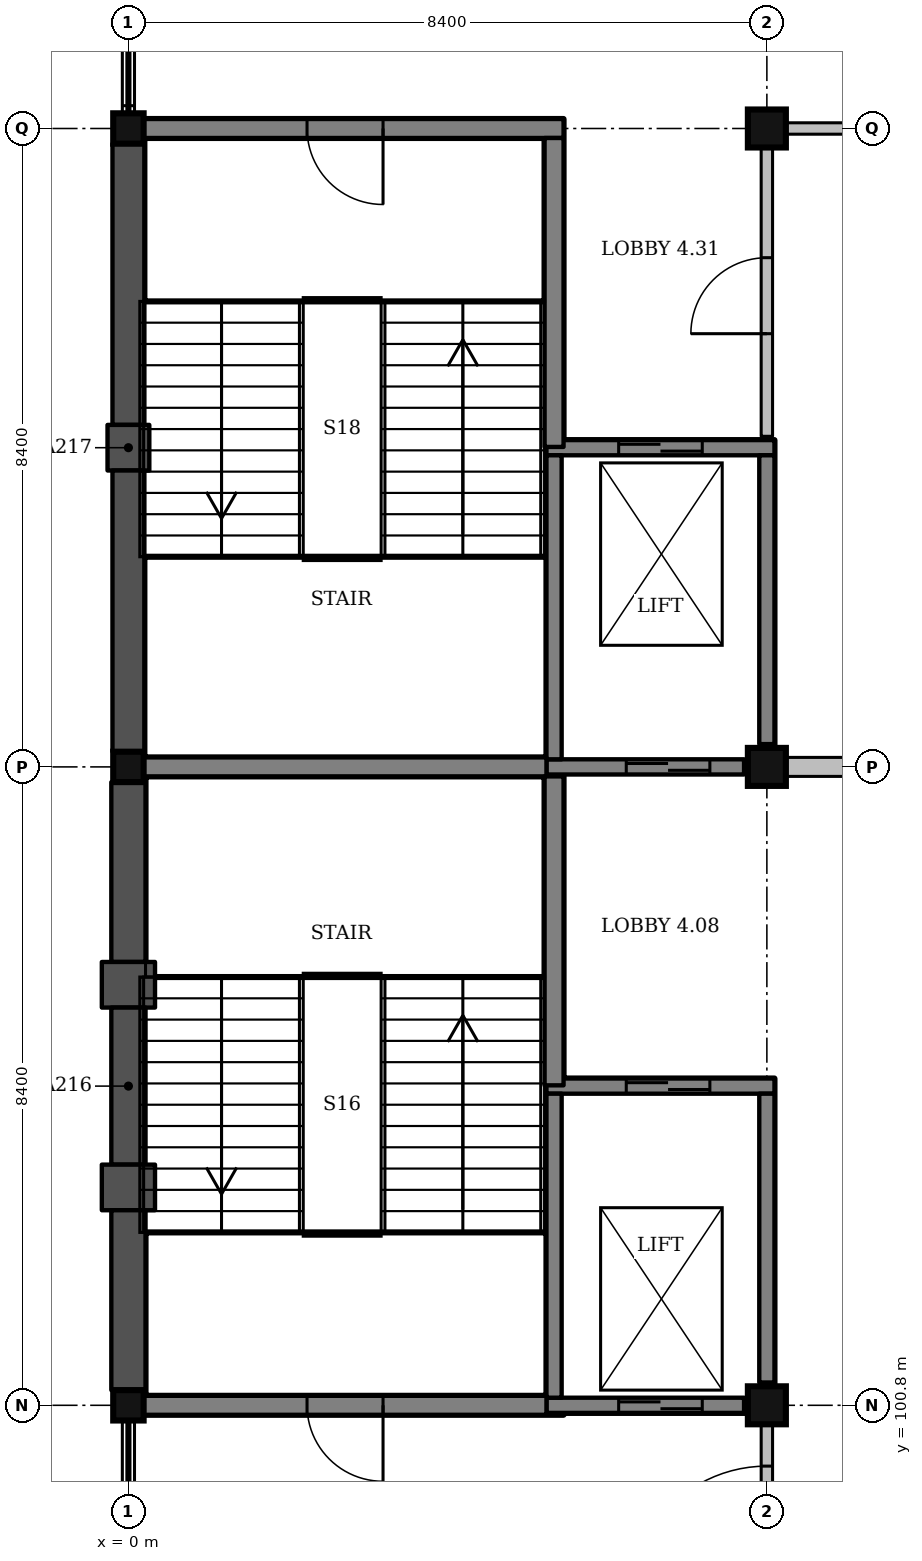
"""IFC4 building model, lengths in metres.
Left out: names, types, materials, properties, quantities, classifications, styles, units other than length and angle.
Written with IfcOpenShell. Run it as: python <this file> out.ifc"""

import sys

from ifc_helpers import new_model, si_unit, direction, frame, frame_2d, origin, origin_2d, place, context, subcontext, project, spatial, rectangle, extrude, element, fill, save


model = new_model("IFC4")
c1 = context("Model", 3, precision=1e-05, world=origin(), true_north=direction((0.0, 1.0)))
c2 = subcontext(c1, "Body", "Model", "MODEL_VIEW")
j1 = project(units=[si_unit("LENGTHUNIT", "METRE"), si_unit("PLANEANGLEUNIT", "RADIAN")], contexts=[c1])
p1 = place(None, origin())
s1 = spatial("IfcSite", under=j1, at=p1, CompositionType="ELEMENT")
p2 = place(p1, origin())
s2 = spatial("IfcBuilding", under=s1, at=p2, CompositionType="ELEMENT")
p3 = place(p2, frame((0.0, 0.0, 18.0)))
s3 = spatial("IfcBuildingStorey", under=s2, at=p3, CompositionType="ELEMENT", Elevation=18.0)
for number, where, z_axis, x_axis in (
    (1, (0.0, 100.8, 0.0), (0.0, 0.0, 1.0), (1.0, 0.0, 0.0)),
    (2, (0.0, 109.2, 0.0), (0.0, 0.0, 1.0), (1.0, 0.0, 0.0)),
):
    element("IfcColumn", number, at=place(p3, frame(where, z_axis=z_axis, x_axis=x_axis)), inside=s3, PredefinedType="COLUMN", context=c2, shape_type="SweptSolid", body=[
        extrude(rectangle(XDim=0.4, YDim=0.4, at=origin_2d()), origin(), (0.0, 0.0, 1.0), 4.5),
    ])
for number, where, z_axis, x_axis in (
    (3, (8.4, 100.8, 0.0), (0.0, 0.0, 1.0), (1.0, 0.0, 0.0)),
    (4, (8.4, 109.2, 0.0), (0.0, 0.0, 1.0), (1.0, 0.0, 0.0)),
):
    element("IfcColumn", number, at=place(p3, frame(where, z_axis=z_axis, x_axis=x_axis)), inside=s3, PredefinedType="COLUMN", context=c2, shape_type="SweptSolid", body=[
        extrude(rectangle(XDim=0.5, YDim=0.5, at=origin_2d()), origin(), (0.0, 0.0, 1.0), 4.5),
    ])
p4 = place(p3, frame((0.0, 117.6, 0.0), z_axis=(0.0, 0.0, 1.0), x_axis=(1.0, 0.0, 0.0)))
e5 = element("IfcColumn", 5, at=p4, inside=s3, PredefinedType="COLUMN", context=c2, shape_type="SweptSolid", body=[
    extrude(rectangle(XDim=0.4, YDim=0.4, at=origin_2d()), origin(), (0.0, 0.0, 1.0), 4.5),
])
p5 = place(p3, frame((8.4, 117.6, 0.0), z_axis=(0.0, 0.0, 1.0), x_axis=(1.0, 0.0, 0.0)))
e6 = element("IfcColumn", 6, at=p5, inside=s3, PredefinedType="COLUMN", context=c2, shape_type="SweptSolid", body=[
    extrude(rectangle(XDim=0.5, YDim=0.5, at=origin_2d()), origin(), (0.0, 0.0, 1.0), 4.5),
])
p6 = place(p3, frame((5.5, 100.8, 0.0), z_axis=(0.0, 0.0, 1.0), x_axis=(1.0, 0.0, 0.0)))
e7 = element("IfcWall", 7, at=p6, inside=s3, PredefinedType="SHEAR", context=c2, shape_type="SweptSolid", body=[
    extrude(rectangle(XDim=2.6, YDim=0.2, at=frame_2d((1.3, 0.0))), origin(), (0.0, 0.0, 1.0), 4.5),
])
p7 = place(p6, frame((0.95, 0.0, 0.0)))
e8 = element("IfcOpeningElement", 8, at=p7, cuts=e7, PredefinedType="OPENING", context=c2, shape_type="SweptSolid", body=[
    extrude(rectangle(XDim=1.1, YDim=2.1, at=frame_2d((0.55, 1.05))), frame((0.0, 0.11, 0.0), z_axis=(0.0, -1.0, 0.0), x_axis=(1.0, 0.0, 0.0)), (0.0, 0.0, 1.0), 0.22),
])
p8 = place(p3, frame((5.5, 105.0, 0.0), z_axis=(0.0, 0.0, 1.0), x_axis=(1.0, 0.0, 0.0)))
e9 = element("IfcWall", 9, at=p8, inside=s3, PredefinedType="SHEAR", context=c2, shape_type="SweptSolid", body=[
    extrude(rectangle(XDim=3.0, YDim=0.2, at=frame_2d((1.5, 0.0))), origin(), (0.0, 0.0, 1.0), 4.5),
])
p9 = place(p8, frame((1.05, 0.0, 0.0)))
e10 = element("IfcOpeningElement", 10, at=p9, cuts=e9, PredefinedType="OPENING", context=c2, shape_type="SweptSolid", body=[
    extrude(rectangle(XDim=1.1, YDim=2.1, at=frame_2d((0.55, 1.05))), frame((0.0, 0.11, 0.0), z_axis=(0.0, -1.0, 0.0), x_axis=(1.0, 0.0, 0.0)), (0.0, 0.0, 1.0), 0.22),
])
p10 = place(p3, frame((5.6, 100.9, 0.0), z_axis=(0.0, 0.0, 1.0), x_axis=(0.0, 1.0, 0.0)))
e11 = element("IfcWall", 11, at=p10, inside=s3, PredefinedType="SHEAR", context=c2, shape_type="SweptSolid", body=[
    extrude(rectangle(XDim=4.0, YDim=0.2, at=frame_2d((2.0, 0.0))), origin(), (0.0, 0.0, 1.0), 4.5),
])
p11 = place(p3, frame((8.4, 101.1, 0.0), z_axis=(0.0, 0.0, 1.0), x_axis=(0.0, 1.0, 0.0)))
e12 = element("IfcWall", 12, at=p11, inside=s3, PredefinedType="SHEAR", context=c2, shape_type="SweptSolid", body=[
    extrude(rectangle(XDim=3.8, YDim=0.2, at=frame_2d((1.9, 0.0))), origin(), (0.0, 0.0, 1.0), 4.5),
])
p12 = place(p3, frame((5.5, 109.2, 0.0), z_axis=(0.0, 0.0, 1.0), x_axis=(1.0, 0.0, 0.0)))
e13 = element("IfcWall", 13, at=p12, inside=s3, PredefinedType="SHEAR", context=c2, shape_type="SweptSolid", body=[
    extrude(rectangle(XDim=2.6, YDim=0.2, at=frame_2d((1.3, 0.0))), origin(), (0.0, 0.0, 1.0), 4.5),
])
p13 = place(p12, frame((1.05, 0.0, 0.0)))
e14 = element("IfcOpeningElement", 14, at=p13, cuts=e13, PredefinedType="OPENING", context=c2, shape_type="SweptSolid", body=[
    extrude(rectangle(XDim=1.1, YDim=2.1, at=frame_2d((0.55, 1.05))), frame((0.0, 0.11, 0.0), z_axis=(0.0, -1.0, 0.0), x_axis=(1.0, 0.0, 0.0)), (0.0, 0.0, 1.0), 0.22),
])
p14 = place(p3, frame((5.5, 113.4, 0.0), z_axis=(0.0, 0.0, 1.0), x_axis=(1.0, 0.0, 0.0)))
e15 = element("IfcWall", 15, at=p14, inside=s3, PredefinedType="SHEAR", context=c2, shape_type="SweptSolid", body=[
    extrude(rectangle(XDim=3.0, YDim=0.2, at=frame_2d((1.5, 0.0))), origin(), (0.0, 0.0, 1.0), 4.5),
])
p15 = place(p14, frame((0.95, 0.0, 0.0)))
e16 = element("IfcOpeningElement", 16, at=p15, cuts=e15, PredefinedType="OPENING", context=c2, shape_type="SweptSolid", body=[
    extrude(rectangle(XDim=1.1, YDim=2.1, at=frame_2d((0.55, 1.05))), frame((0.0, 0.11, 0.0), z_axis=(0.0, -1.0, 0.0), x_axis=(1.0, 0.0, 0.0)), (0.0, 0.0, 1.0), 0.22),
])
p16 = place(p3, frame((5.6, 109.3, 0.0), z_axis=(0.0, 0.0, 1.0), x_axis=(0.0, 1.0, 0.0)))
e17 = element("IfcWall", 17, at=p16, inside=s3, PredefinedType="SHEAR", context=c2, shape_type="SweptSolid", body=[
    extrude(rectangle(XDim=4.0, YDim=0.2, at=frame_2d((2.0, 0.0))), origin(), (0.0, 0.0, 1.0), 4.5),
])
p17 = place(p3, frame((8.4, 109.5, 0.0), z_axis=(0.0, 0.0, 1.0), x_axis=(0.0, 1.0, 0.0)))
e18 = element("IfcWall", 18, at=p17, inside=s3, PredefinedType="SHEAR", context=c2, shape_type="SweptSolid", body=[
    extrude(rectangle(XDim=3.8, YDim=0.2, at=frame_2d((1.9, 0.0))), origin(), (0.0, 0.0, 1.0), 4.5),
])
p18 = place(p3, frame((0.2, 100.8, 0.0), z_axis=(0.0, 0.0, 1.0), x_axis=(1.0, 0.0, 0.0)))
e19 = element("IfcWall", 19, at=p18, inside=s3, PredefinedType="SHEAR", context=c2, shape_type="SweptSolid", body=[
    extrude(rectangle(XDim=5.3, YDim=0.25, at=frame_2d((2.65, 0.0))), origin(), (0.0, 0.0, 1.0), 4.5),
])
p19 = place(p18, frame((2.15, 0.0, 0.0)))
e20 = element("IfcOpeningElement", 20, at=p19, cuts=e19, PredefinedType="OPENING", context=c2, shape_type="SweptSolid", body=[
    extrude(rectangle(XDim=1.0, YDim=2.1, at=frame_2d((0.5, 1.05))), frame((0.0, 0.135, 0.0), z_axis=(0.0, -1.0, 0.0), x_axis=(1.0, 0.0, 0.0)), (0.0, 0.0, 1.0), 0.27),
])
p20 = place(p3, frame((0.2, 109.2, 0.0), z_axis=(0.0, 0.0, 1.0), x_axis=(1.0, 0.0, 0.0)))
e21 = element("IfcWall", 21, at=p20, inside=s3, PredefinedType="SHEAR", context=c2, shape_type="SweptSolid", body=[
    extrude(rectangle(XDim=5.3, YDim=0.25, at=frame_2d((2.65, 0.0))), origin(), (0.0, 0.0, 1.0), 4.5),
])
p21 = place(p3, frame((5.6, 105.01, 0.0), z_axis=(0.0, 0.0, 1.0), x_axis=(0.0, 1.0, 0.0)))
e22 = element("IfcWall", 22, at=p21, inside=s3, PredefinedType="SHEAR", context=c2, shape_type="SweptSolid", body=[
    extrude(rectangle(XDim=4.065, YDim=0.25, at=frame_2d((2.032, 0.0))), origin(), (0.0, 0.0, 1.0), 4.5),
])
p22 = place(p3, frame((0.2, 117.6, 0.0), z_axis=(0.0, 0.0, 1.0), x_axis=(1.0, 0.0, 0.0)))
e23 = element("IfcWall", 23, at=p22, inside=s3, PredefinedType="SHEAR", context=c2, shape_type="SweptSolid", body=[
    extrude(rectangle(XDim=5.525, YDim=0.25, at=frame_2d((2.763, 0.0))), origin(), (0.0, 0.0, 1.0), 4.5),
])
p23 = place(p22, frame((2.15, 0.0, 0.0)))
e24 = element("IfcOpeningElement", 24, at=p23, cuts=e23, PredefinedType="OPENING", context=c2, shape_type="SweptSolid", body=[
    extrude(rectangle(XDim=1.0, YDim=2.1, at=frame_2d((0.5, 1.05))), frame((0.0, 0.135, 0.0), z_axis=(0.0, -1.0, 0.0), x_axis=(1.0, 0.0, 0.0)), (0.0, 0.0, 1.0), 0.27),
])
p24 = place(p3, frame((5.6, 113.41, 0.0), z_axis=(0.0, 0.0, 1.0), x_axis=(0.0, 1.0, 0.0)))
e25 = element("IfcWall", 25, at=p24, inside=s3, PredefinedType="SHEAR", context=c2, shape_type="SweptSolid", body=[
    extrude(rectangle(XDim=4.065, YDim=0.25, at=frame_2d((2.033, 0.0))), origin(), (0.0, 0.0, 1.0), 4.5),
])
p25 = place(p3, frame((0.0, 109.0, 0.0), z_axis=(0.0, 0.0, 1.0), x_axis=(0.0, -1.0, 0.0)))
e26 = element("IfcWall", 26, at=p25, inside=s3, PredefinedType="SOLIDWALL", context=c2, shape_type="SweptSolid", body=[
    extrude(rectangle(XDim=2.367, YDim=0.45, at=frame_2d((1.183, 0.0))), origin(), (0.0, 0.0, 1.0), 3.65),
])
p26 = place(p3, frame((0.0, 106.633, 0.0), z_axis=(0.0, 0.0, 1.0), x_axis=(0.0, -1.0, 0.0)))
e27 = element("IfcWall", 27, at=p26, inside=s3, PredefinedType="SOLIDWALL", context=c2, shape_type="SweptSolid", body=[
    extrude(rectangle(XDim=0.6, YDim=0.7, at=frame_2d((0.3, 0.0))), origin(), (0.0, 0.0, 1.0), 3.65),
])
p27 = place(p3, frame((0.0, 106.033, 0.0), z_axis=(0.0, 0.0, 1.0), x_axis=(0.0, -1.0, 0.0)))
e28 = element("IfcWall", 28, at=p27, inside=s3, PredefinedType="SOLIDWALL", context=c2, shape_type="SweptSolid", body=[
    extrude(rectangle(XDim=2.066, YDim=0.45, at=frame_2d((1.033, 0.0))), origin(), (0.0, 0.0, 1.0), 3.65),
])
p28 = place(p3, frame((0.0, 103.967, 0.0), z_axis=(0.0, 0.0, 1.0), x_axis=(0.0, -1.0, 0.0)))
e29 = element("IfcWall", 29, at=p28, inside=s3, PredefinedType="SOLIDWALL", context=c2, shape_type="SweptSolid", body=[
    extrude(rectangle(XDim=0.6, YDim=0.7, at=frame_2d((0.3, 0.0))), origin(), (0.0, 0.0, 1.0), 3.65),
])
p29 = place(p3, frame((0.0, 103.367, 0.0), z_axis=(0.0, 0.0, 1.0), x_axis=(0.0, -1.0, 0.0)))
e30 = element("IfcWall", 30, at=p29, inside=s3, PredefinedType="SOLIDWALL", context=c2, shape_type="SweptSolid", body=[
    extrude(rectangle(XDim=2.367, YDim=0.45, at=frame_2d((1.183, 0.0))), origin(), (0.0, 0.0, 1.0), 3.65),
])
p30 = place(p3, frame((0.0, 117.4, 0.0), z_axis=(0.0, 0.0, 1.0), x_axis=(0.0, -1.0, 0.0)))
e31 = element("IfcWall", 31, at=p30, inside=s3, PredefinedType="SOLIDWALL", context=c2, shape_type="SweptSolid", body=[
    extrude(rectangle(XDim=3.7, YDim=0.42, at=frame_2d((1.85, 0.0))), origin(), (0.0, 0.0, 1.0), 4.5),
])
p31 = place(p3, frame((0.0, 113.7, 0.0), z_axis=(0.0, 0.0, 1.0), x_axis=(0.0, -1.0, 0.0)))
e32 = element("IfcWall", 32, at=p31, inside=s3, PredefinedType="SOLIDWALL", context=c2, shape_type="SweptSolid", body=[
    extrude(rectangle(XDim=0.6, YDim=0.55, at=frame_2d((0.3, 0.0))), origin(), (0.0, 0.0, 1.0), 4.5),
])
p32 = place(p3, frame((0.0, 113.1, 0.0), z_axis=(0.0, 0.0, 1.0), x_axis=(0.0, -1.0, 0.0)))
e33 = element("IfcWall", 33, at=p32, inside=s3, PredefinedType="SOLIDWALL", context=c2, shape_type="SweptSolid", body=[
    extrude(rectangle(XDim=3.7, YDim=0.42, at=frame_2d((1.85, 0.0))), origin(), (0.0, 0.0, 1.0), 4.5),
])
p33 = place(p3, frame((8.65, 109.2, 0.0), z_axis=(0.0, 0.0, 1.0), x_axis=(1.0, 0.0, 0.0)))
e34 = element("IfcWall", 34, at=p33, inside=s3, PredefinedType="SOLIDWALL", context=c2, shape_type="SweptSolid", body=[
    extrude(rectangle(XDim=7.9, YDim=0.25, at=frame_2d((3.95, 0.0))), origin(), (0.0, 0.0, 1.0), 4.15),
])
p34 = place(p3, frame((8.65, 117.6, 0.0), z_axis=(0.0, 0.0, 1.0), x_axis=(1.0, 0.0, 0.0)))
e35 = element("IfcWall", 35, at=p34, inside=s3, PredefinedType="PARTITIONING", context=c2, shape_type="SweptSolid", body=[
    extrude(rectangle(XDim=7.9, YDim=0.15, at=frame_2d((3.95, 0.0))), origin(), (0.0, 0.0, 1.0), 3.4),
])
p35 = place(p3, frame((8.4, 92.65, 0.0), z_axis=(0.0, 0.0, 1.0), x_axis=(0.0, 1.0, 0.0)))
e36 = element("IfcWall", 36, at=p35, inside=s3, PredefinedType="PARTITIONING", context=c2, shape_type="SweptSolid", body=[
    extrude(rectangle(XDim=7.9, YDim=0.15, at=frame_2d((3.95, 0.0))), origin(), (0.0, 0.0, 1.0), 3.4),
])
p36 = place(p35, frame((5.55, 0.0, 0.0)))
e37 = element("IfcOpeningElement", 37, at=p36, cuts=e36, PredefinedType="OPENING", context=c2, shape_type="SweptSolid", body=[
    extrude(rectangle(XDim=1.8, YDim=2.1, at=frame_2d((0.9, 1.05))), frame((0.0, 0.085, 0.0), z_axis=(0.0, -1.0, 0.0), x_axis=(1.0, 0.0, 0.0)), (0.0, 0.0, 1.0), 0.17),
])
p37 = place(p3, frame((8.4, 113.55, 0.0), z_axis=(0.0, 0.0, 1.0), x_axis=(0.0, 1.0, 0.0)))
e38 = element("IfcWall", 38, at=p37, inside=s3, PredefinedType="PARTITIONING", context=c2, shape_type="SweptSolid", body=[
    extrude(rectangle(XDim=3.8, YDim=0.15, at=frame_2d((1.9, 0.0))), origin(), (0.0, 0.0, 1.0), 3.4),
])
p38 = place(p37, frame((1.35, 0.0, 0.0)))
e39 = element("IfcOpeningElement", 39, at=p38, cuts=e38, PredefinedType="OPENING", context=c2, shape_type="SweptSolid", body=[
    extrude(rectangle(XDim=1.0, YDim=2.1, at=frame_2d((0.5, 1.05))), frame((0.0, 0.085, 0.0), z_axis=(0.0, -1.0, 0.0), x_axis=(1.0, 0.0, 0.0)), (0.0, 0.0, 1.0), 0.17),
])
p39 = place(p36, origin())
e40 = element("IfcDoor", 40, at=p39, inside=s3, OperationType="DOUBLE_DOOR_SINGLE_SWING", PredefinedType="DOOR", context=c2, shape_type="SweptSolid", body=[
    extrude(rectangle(XDim=1.8, YDim=2.1, at=frame_2d((0.9, 1.05))), frame((0.0, 0.025, 0.0), z_axis=(0.0, -1.0, 0.0), x_axis=(1.0, 0.0, 0.0)), (0.0, 0.0, 1.0), 0.05),
])
fill(e37, e40)
p40 = place(p38, origin())
e41 = element("IfcDoor", 41, at=p40, inside=s3, OperationType="SINGLE_SWING_LEFT", PredefinedType="DOOR", context=c2, shape_type="SweptSolid", body=[
    extrude(rectangle(XDim=1.0, YDim=2.1, at=frame_2d((0.5, 1.05))), frame((0.0, 0.025, 0.0), z_axis=(0.0, -1.0, 0.0), x_axis=(1.0, 0.0, 0.0)), (0.0, 0.0, 1.0), 0.05),
])
fill(e39, e41)
p41 = place(p19, origin())
e42 = element("IfcDoor", 42, at=p41, inside=s3, OperationType="SINGLE_SWING_RIGHT", PredefinedType="DOOR", context=c2, shape_type="SweptSolid", body=[
    extrude(rectangle(XDim=1.0, YDim=2.1, at=frame_2d((0.5, 1.05))), frame((0.0, 0.025, 0.0), z_axis=(0.0, -1.0, 0.0), x_axis=(1.0, 0.0, 0.0)), (0.0, 0.0, 1.0), 0.05),
])
fill(e20, e42)
p42 = place(p23, origin())
e43 = element("IfcDoor", 43, at=p42, inside=s3, OperationType="SINGLE_SWING_RIGHT", PredefinedType="DOOR", context=c2, shape_type="SweptSolid", body=[
    extrude(rectangle(XDim=1.0, YDim=2.1, at=frame_2d((0.5, 1.05))), frame((0.0, 0.025, 0.0), z_axis=(0.0, -1.0, 0.0), x_axis=(1.0, 0.0, 0.0)), (0.0, 0.0, 1.0), 0.05),
])
fill(e24, e43)
p43 = place(p7, origin())
e44 = element("IfcDoor", 44, at=p43, inside=s3, OperationType="SLIDING_TO_RIGHT", PredefinedType="DOOR", context=c2, shape_type="SweptSolid", body=[
    extrude(rectangle(XDim=1.1, YDim=2.1, at=frame_2d((0.55, 1.05))), frame((0.0, 0.025, 0.0), z_axis=(0.0, -1.0, 0.0), x_axis=(1.0, 0.0, 0.0)), (0.0, 0.0, 1.0), 0.05),
])
fill(e8, e44)
p44 = place(p9, origin())
e45 = element("IfcDoor", 45, at=p44, inside=s3, OperationType="SLIDING_TO_LEFT", PredefinedType="DOOR", context=c2, shape_type="SweptSolid", body=[
    extrude(rectangle(XDim=1.1, YDim=2.1, at=frame_2d((0.55, 1.05))), frame((0.0, 0.025, 0.0), z_axis=(0.0, -1.0, 0.0), x_axis=(1.0, 0.0, 0.0)), (0.0, 0.0, 1.0), 0.05),
])
fill(e10, e45)
p45 = place(p13, origin())
e46 = element("IfcDoor", 46, at=p45, inside=s3, OperationType="SLIDING_TO_RIGHT", PredefinedType="DOOR", context=c2, shape_type="SweptSolid", body=[
    extrude(rectangle(XDim=1.1, YDim=2.1, at=frame_2d((0.55, 1.05))), frame((0.0, 0.025, 0.0), z_axis=(0.0, -1.0, 0.0), x_axis=(1.0, 0.0, 0.0)), (0.0, 0.0, 1.0), 0.05),
])
fill(e14, e46)
p46 = place(p15, origin())
e47 = element("IfcDoor", 47, at=p46, inside=s3, OperationType="SLIDING_TO_LEFT", PredefinedType="DOOR", context=c2, shape_type="SweptSolid", body=[
    extrude(rectangle(XDim=1.1, YDim=2.1, at=frame_2d((0.55, 1.05))), frame((0.0, 0.025, 0.0), z_axis=(0.0, -1.0, 0.0), x_axis=(1.0, 0.0, 0.0)), (0.0, 0.0, 1.0), 0.05),
])
fill(e16, e47)
save(model, sys.argv[1])
